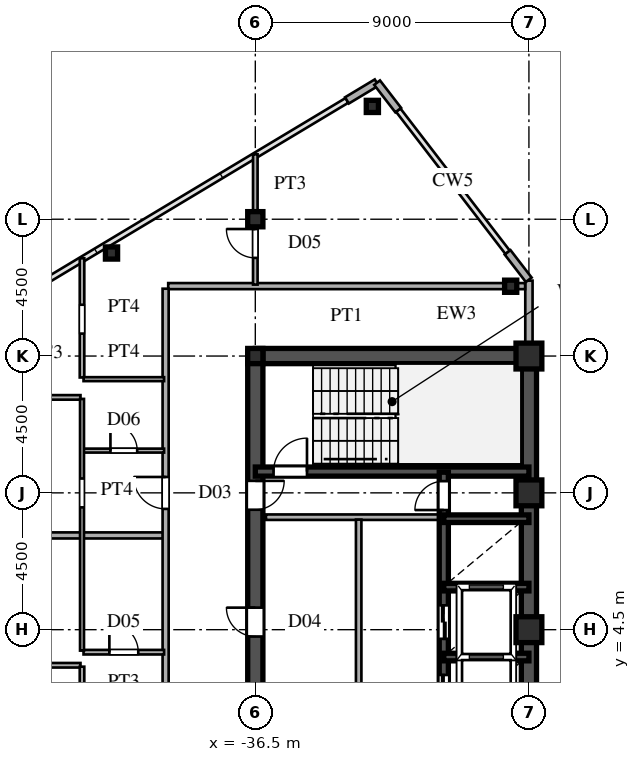
"""IFC4 building model, lengths in metres.
Left out: names, types, materials, properties, quantities, classifications, styles, units other than length and angle.
Written with IfcOpenShell. Run it as: python <this file> out.ifc"""

import sys

from ifc_helpers import new_model, si_unit, direction, frame, frame_2d, origin, origin_2d, place, context, subcontext, project, spatial, rectangle, hollow_rectangle, i_section, extrude, source, transform, mapped, element, fill, save


model = new_model("IFC4")
c1 = context("Model", 3, precision=1e-05, world=origin(), true_north=direction((0.0, 1.0)))
c2 = subcontext(c1, "Body", "Model", "MODEL_VIEW")
j1 = project(units=[si_unit("LENGTHUNIT", "METRE"), si_unit("PLANEANGLEUNIT", "RADIAN")], contexts=[c1])
p1 = place(None, origin())
s1 = spatial("IfcSite", under=j1, at=p1, CompositionType="ELEMENT")
p2 = place(p1, origin())
s2 = spatial("IfcBuilding", under=s1, at=p2, CompositionType="ELEMENT")
p3 = place(p2, frame((0.0, 0.0, 217.5)))
s3 = spatial("IfcBuildingStorey", under=s2, at=p3, CompositionType="ELEMENT", Elevation=217.5)
m1 = source(origin(), c2, "Body", "SweptSolid", [
    extrude(hollow_rectangle(XDim=0.85, YDim=0.85, WallThickness=0.036, at=origin_2d()), origin(), (0.0, 0.0, 1.0), 3.6),
])
for number, where, z_axis, x_axis in (
    (1, (-27.5, 4.5, 0.0), (0.0, 0.0, 1.0), (1.0, 0.0, 0.0)),
    (2, (-27.5, 9.0, 0.0), (0.0, 0.0, 1.0), (1.0, 0.0, 0.0)),
    (3, (-27.5, 13.5, 0.0), (0.0, 0.0, 1.0), (1.0, 0.0, 0.0)),
):
    element("IfcColumn", number, at=place(p3, frame(where, z_axis=z_axis, x_axis=x_axis)), inside=s3, PredefinedType="COLUMN", context=c2, shape_type="MappedRepresentation", body=[
        mapped(m1, transform((0.0, 0.0, 0.0), scale=1.0)),
    ])
m2 = source(origin(), c2, "Body", "SweptSolid", [
    extrude(i_section(OverallWidth=0.5, OverallDepth=0.5, WebThickness=0.02, FlangeThickness=0.032, at=origin_2d()), origin(), (0.0, 0.0, 1.0), 3.6),
])
for number, where, z_axis, x_axis in (
    (4, (-36.5, 13.5, 0.0), (0.0, 0.0, 1.0), (1.0, 0.0, 0.0)),
    (5, (-36.5, 18.0, 0.0), (0.0, 0.0, 1.0), (1.0, 0.0, 0.0)),
):
    element("IfcColumn", number, at=place(p3, frame(where, z_axis=z_axis, x_axis=x_axis)), inside=s3, PredefinedType="COLUMN", context=c2, shape_type="MappedRepresentation", body=[
        mapped(m2, transform((0.0, 0.0, 0.0), scale=1.0)),
    ])
m3 = source(origin(), c2, "Body", "SweptSolid", [
    extrude(hollow_rectangle(XDim=0.4, YDim=0.4, WallThickness=0.016, at=origin_2d()), origin(), (0.0, 0.0, 1.0), 3.6),
])
for number, where, z_axis, x_axis in (
    (6, (-28.1, 15.796, 0.0), (0.0, 0.0, 1.0), (1.0, 0.0, 0.0)),
    (7, (-32.65, 21.71, 0.0), (0.0, 0.0, 1.0), (1.0, 0.0, 0.0)),
    (8, (-41.23, 16.889, 0.0), (0.0, 0.0, 1.0), (1.0, 0.0, 0.0)),
):
    element("IfcColumn", number, at=place(p3, frame(where, z_axis=z_axis, x_axis=x_axis)), inside=s3, PredefinedType="COLUMN", context=c2, shape_type="MappedRepresentation", body=[
        mapped(m3, transform((0.0, 0.0, 0.0), scale=1.0)),
    ])
p4 = place(p3, frame((-27.5, 13.755, 0.0), z_axis=(0.0, 0.0, 1.0), x_axis=(0.0, 1.0, 0.0)))
e9 = element("IfcWall", 9, at=p4, inside=s3, PredefinedType="SOLIDWALL", context=c2, shape_type="SweptSolid", body=[
    extrude(rectangle(XDim=0.62, YDim=0.24, at=frame_2d((0.31, 0.0))), origin(), (0.0, 0.0, 1.0), 2.88),
])
p5 = place(p3, frame((-27.5, 14.375, 0.0), z_axis=(0.0, 0.0, 1.0), x_axis=(0.0, 1.0, 0.0)))
e10 = element("IfcWall", 10, at=p5, inside=s3, PredefinedType="SOLIDWALL", context=c2, shape_type="SweptSolid", body=[
    extrude(rectangle(XDim=1.605, YDim=0.24, at=frame_2d((0.803, 0.0))), origin(), (0.0, 0.0, 1.0), 3.38),
])
for number, where, z_axis, x_axis in (
    (11, (-27.506, 16.008, 0.0), (0.0, 0.0, 1.0), (-0.61, 0.793, 0.0)),
    (12, (-31.799, 21.588, 0.0), (0.0, 0.0, 1.0), (-0.61, 0.793, 0.0)),
    (13, (-32.509, 22.495, 0.0), (0.0, 0.0, 1.0), (-0.857, -0.515, 0.0)),
):
    element("IfcWall", number, at=place(p3, frame(where, z_axis=z_axis, x_axis=x_axis)), inside=s3, PredefinedType="SOLIDWALL", context=c2, shape_type="SweptSolid", body=[
        extrude(rectangle(XDim=1.14, YDim=0.24, at=frame_2d((0.57, 0.0))), origin(), (0.0, 0.0, 1.0), 3.38),
    ])
p6 = place(p3, frame((-27.5, 1.3, 0.0), z_axis=(0.0, 0.0, 1.0), x_axis=(0.0, 1.0, 0.0)))
e14 = element("IfcWall", 14, at=p6, inside=s3, PredefinedType="SHEAR", context=c2, shape_type="SweptSolid", body=[
    extrude(rectangle(XDim=12.2, YDim=0.5, at=frame_2d((6.1, 0.0))), origin(), (0.0, 0.0, 1.0), 3.38),
])
p7 = place(p3, frame((-36.5, 13.5, 0.0), z_axis=(0.0, 0.0, 1.0), x_axis=(1.0, 0.0, 0.0)))
e15 = element("IfcWall", 15, at=p7, inside=s3, PredefinedType="SHEAR", context=c2, shape_type="SweptSolid", body=[
    extrude(rectangle(XDim=9.0, YDim=0.5, at=frame_2d((4.5, 0.0))), origin(), (0.0, 0.0, 1.0), 3.38),
])
p8 = place(p3, frame((-36.5, 8.2, 0.0), z_axis=(0.0, 0.0, 1.0), x_axis=(0.0, 1.0, 0.0)))
e16 = element("IfcWall", 16, at=p8, inside=s3, PredefinedType="SHEAR", context=c2, shape_type="SweptSolid", body=[
    extrude(rectangle(XDim=5.45, YDim=0.5, at=frame_2d((2.725, 0.0))), origin(), (0.0, 0.0, 1.0), 3.38),
])
p9 = place(p8, frame((0.245, 0.0, 0.0)))
e17 = element("IfcOpeningElement", 17, at=p9, cuts=e16, PredefinedType="OPENING", context=c2, shape_type="SweptSolid", body=[
    extrude(rectangle(XDim=0.95, YDim=2.15, at=frame_2d((0.475, 1.075))), frame((0.0, 0.26, 0.0), z_axis=(0.0, -1.0, 0.0), x_axis=(1.0, 0.0, 0.0)), (0.0, 0.0, 1.0), 0.52),
])
p10 = place(p3, frame((-36.5, 1.3, 0.0), z_axis=(0.0, 0.0, 1.0), x_axis=(0.0, 1.0, 0.0)))
e18 = element("IfcWall", 18, at=p10, inside=s3, PredefinedType="SHEAR", context=c2, shape_type="SweptSolid", body=[
    extrude(rectangle(XDim=6.9, YDim=0.5, at=frame_2d((3.45, 0.0))), origin(), (0.0, 0.0, 1.0), 3.38),
])
p11 = place(p10, frame((2.975, 0.0, 0.0)))
e19 = element("IfcOpeningElement", 19, at=p11, cuts=e18, PredefinedType="OPENING", context=c2, shape_type="SweptSolid", body=[
    extrude(rectangle(XDim=0.95, YDim=2.15, at=frame_2d((0.475, 1.075))), frame((0.0, 0.26, 0.0), z_axis=(0.0, -1.0, 0.0), x_axis=(1.0, 0.0, 0.0)), (0.0, 0.0, 1.0), 0.52),
])
p12 = place(p3, frame((-36.5, 9.7, 0.0), z_axis=(0.0, 0.0, 1.0), x_axis=(1.0, 0.0, 0.0)))
e20 = element("IfcWall", 20, at=p12, inside=s3, PredefinedType="SHEAR", context=c2, shape_type="SweptSolid", body=[
    extrude(rectangle(XDim=9.0, YDim=0.3, at=frame_2d((4.5, 0.0))), origin(), (0.0, 0.0, 1.0), 3.38),
])
p13 = place(p12, frame((0.6, 0.0, 0.0)))
e21 = element("IfcOpeningElement", 21, at=p13, cuts=e20, PredefinedType="OPENING", context=c2, shape_type="SweptSolid", body=[
    extrude(rectangle(XDim=1.1, YDim=2.2, at=frame_2d((0.55, 1.1))), frame((0.0, 0.16, 0.0), z_axis=(0.0, -1.0, 0.0), x_axis=(1.0, 0.0, 0.0)), (0.0, 0.0, 1.0), 0.32),
])
for number, where, z_axis, x_axis in (
    (22, (-30.3, 3.6, 0.0), (0.0, 0.0, 1.0), (1.0, 0.0, 0.0)),
    (23, (-30.3, 5.9, 0.0), (0.0, 0.0, 1.0), (1.0, 0.0, 0.0)),
    (24, (-30.3, 8.15, 0.0), (0.0, 0.0, 1.0), (1.0, 0.0, 0.0)),
):
    element("IfcWall", number, at=place(p3, frame(where, z_axis=z_axis, x_axis=x_axis)), inside=s3, PredefinedType="SHEAR", context=c2, shape_type="SweptSolid", body=[
        extrude(rectangle(XDim=2.8, YDim=0.25, at=frame_2d((1.4, 0.0))), origin(), (0.0, 0.0, 1.0), 3.38),
    ])
p14 = place(p3, frame((-30.3, 1.32, 0.0), z_axis=(0.0, 0.0, 1.0), x_axis=(0.0, 1.0, 0.0)))
e25 = element("IfcWall", 25, at=p14, inside=s3, PredefinedType="SHEAR", context=c2, shape_type="SweptSolid", body=[
    extrude(rectangle(XDim=2.28, YDim=0.3, at=frame_2d((1.14, 0.0))), origin(), (0.0, 0.0, 1.0), 3.38),
])
p15 = place(p14, frame((0.59, 0.0, 0.0)))
e26 = element("IfcOpeningElement", 26, at=p15, cuts=e25, PredefinedType="OPENING", context=c2, shape_type="SweptSolid", body=[
    extrude(rectangle(XDim=1.1, YDim=2.2, at=frame_2d((0.55, 1.1))), frame((0.0, 0.16, 0.0), z_axis=(0.0, -1.0, 0.0), x_axis=(1.0, 0.0, 0.0)), (0.0, 0.0, 1.0), 0.32),
])
p16 = place(p3, frame((-30.3, 3.6, 0.0), z_axis=(0.0, 0.0, 1.0), x_axis=(0.0, 1.0, 0.0)))
e27 = element("IfcWall", 27, at=p16, inside=s3, PredefinedType="SHEAR", context=c2, shape_type="SweptSolid", body=[
    extrude(rectangle(XDim=2.3, YDim=0.3, at=frame_2d((1.15, 0.0))), origin(), (0.0, 0.0, 1.0), 3.38),
])
p17 = place(p16, frame((0.6, 0.0, 0.0)))
e28 = element("IfcOpeningElement", 28, at=p17, cuts=e27, PredefinedType="OPENING", context=c2, shape_type="SweptSolid", body=[
    extrude(rectangle(XDim=1.1, YDim=2.2, at=frame_2d((0.55, 1.1))), frame((0.0, 0.16, 0.0), z_axis=(0.0, -1.0, 0.0), x_axis=(1.0, 0.0, 0.0)), (0.0, 0.0, 1.0), 0.32),
])
p18 = place(p3, frame((-30.3, 5.9, 0.0), z_axis=(0.0, 0.0, 1.0), x_axis=(0.0, 1.0, 0.0)))
e29 = element("IfcWall", 29, at=p18, inside=s3, PredefinedType="SHEAR", context=c2, shape_type="SweptSolid", body=[
    extrude(rectangle(XDim=2.25, YDim=0.3, at=frame_2d((1.125, 0.0))), origin(), (0.0, 0.0, 1.0), 3.38),
])
p19 = place(p3, frame((-30.3, 8.15, 0.0), z_axis=(0.0, 0.0, 1.0), x_axis=(0.0, 1.0, 0.0)))
e30 = element("IfcWall", 30, at=p19, inside=s3, PredefinedType="SHEAR", context=c2, shape_type="SweptSolid", body=[
    extrude(rectangle(XDim=1.53, YDim=0.3, at=frame_2d((0.765, 0.0))), origin(), (0.0, 0.0, 1.0), 3.38),
])
p20 = place(p19, frame((0.285, 0.0, 0.0)))
e31 = element("IfcOpeningElement", 31, at=p20, cuts=e30, PredefinedType="OPENING", context=c2, shape_type="SweptSolid", body=[
    extrude(rectangle(XDim=0.95, YDim=2.15, at=frame_2d((0.475, 1.075))), frame((0.0, 0.16, 0.0), z_axis=(0.0, -1.0, 0.0), x_axis=(1.0, 0.0, 0.0)), (0.0, 0.0, 1.0), 0.32),
])
p21 = place(p3, frame((-36.15, 8.2, 0.0), z_axis=(0.0, 0.0, 1.0), x_axis=(1.0, 0.0, 0.0)))
e32 = element("IfcWall", 32, at=p21, inside=s3, PredefinedType="PARTITIONING", context=c2, shape_type="SweptSolid", body=[
    extrude(rectangle(XDim=5.7, YDim=0.18, at=frame_2d((2.85, 0.0))), origin(), (0.0, 0.0, 1.0), 3.38),
])
p22 = place(p3, frame((-33.1, 1.38, 0.0), z_axis=(0.0, 0.0, 1.0), x_axis=(0.0, 1.0, 0.0)))
e33 = element("IfcWall", 33, at=p22, inside=s3, PredefinedType="PARTITIONING", context=c2, shape_type="SweptSolid", body=[
    extrude(rectangle(XDim=6.74, YDim=0.18, at=frame_2d((3.37, 0.0))), origin(), (0.0, 0.0, 1.0), 3.38),
])
p23 = place(p3, frame((-64.48, 3.33, 0.0), z_axis=(0.0, 0.0, 1.0), x_axis=(1.0, 0.0, 0.0)))
e34 = element("IfcWall", 34, at=p23, inside=s3, PredefinedType="PARTITIONING", context=c2, shape_type="SweptSolid", body=[
    extrude(rectangle(XDim=22.23, YDim=0.15, at=frame_2d((11.115, 0.0))), origin(), (0.0, 0.0, 1.0), 3.38),
])
p24 = place(p23, frame((15.655, 0.0, 0.0)))
e35 = element("IfcOpeningElement", 35, at=p24, cuts=e34, PredefinedType="OPENING", context=c2, shape_type="SweptSolid", body=[
    extrude(rectangle(XDim=0.95, YDim=2.15, at=frame_2d((0.475, 1.075))), frame((0.0, 0.085, 0.0), z_axis=(0.0, -1.0, 0.0), x_axis=(1.0, 0.0, 0.0)), (0.0, 0.0, 1.0), 0.17),
])
p25 = place(p23, frame((4.533, 0.0, 0.0)))
e36 = element("IfcOpeningElement", 36, at=p25, cuts=e34, PredefinedType="OPENING", context=c2, shape_type="SweptSolid", body=[
    extrude(rectangle(XDim=0.95, YDim=2.15, at=frame_2d((0.475, 1.075))), frame((0.0, 0.085, 0.0), z_axis=(0.0, -1.0, 0.0), x_axis=(1.0, 0.0, 0.0)), (0.0, 0.0, 1.0), 0.17),
])
p26 = place(p3, frame((-42.15, 3.76, 0.0), z_axis=(0.0, 0.0, 1.0), x_axis=(1.0, 0.0, 0.0)))
e37 = element("IfcWall", 37, at=p26, inside=s3, PredefinedType="PARTITIONING", context=c2, shape_type="SweptSolid", body=[
    extrude(rectangle(XDim=2.65, YDim=0.15, at=frame_2d((1.325, 0.0))), origin(), (0.0, 0.0, 1.0), 3.38),
])
p27 = place(p26, frame((0.85, 0.0, 0.0)))
e38 = element("IfcOpeningElement", 38, at=p27, cuts=e37, PredefinedType="OPENING", context=c2, shape_type="SweptSolid", body=[
    extrude(rectangle(XDim=0.95, YDim=2.15, at=frame_2d((0.475, 1.075))), frame((0.0, 0.085, 0.0), z_axis=(0.0, -1.0, 0.0), x_axis=(1.0, 0.0, 0.0)), (0.0, 0.0, 1.0), 0.17),
])
p28 = place(p3, frame((-57.343, 7.6, 0.0), z_axis=(0.0, 0.0, 1.0), x_axis=(1.0, 0.0, 0.0)))
e39 = element("IfcWall", 39, at=p28, inside=s3, PredefinedType="PARTITIONING", context=c2, shape_type="SweptSolid", body=[
    extrude(rectangle(XDim=17.813, YDim=0.2, at=frame_2d((8.906, 0.0))), origin(), (0.0, 0.0, 1.0), 3.38),
])
p29 = place(p3, frame((-42.15, 10.39, 0.0), z_axis=(0.0, 0.0, 1.0), x_axis=(1.0, 0.0, 0.0)))
e40 = element("IfcWall", 40, at=p29, inside=s3, PredefinedType="PARTITIONING", context=c2, shape_type="SweptSolid", body=[
    extrude(rectangle(XDim=2.65, YDim=0.13, at=frame_2d((1.325, 0.0))), origin(), (0.0, 0.0, 1.0), 3.38),
])
p30 = place(p29, frame((0.885, 0.0, 0.0)))
e41 = element("IfcOpeningElement", 41, at=p30, cuts=e40, PredefinedType="OPENING", context=c2, shape_type="SweptSolid", body=[
    extrude(rectangle(XDim=0.88, YDim=2.1, at=frame_2d((0.44, 1.05))), frame((0.0, 0.075, 0.0), z_axis=(0.0, -1.0, 0.0), x_axis=(1.0, 0.0, 0.0)), (0.0, 0.0, 1.0), 0.15),
])
p31 = place(p3, frame((-49.802, 12.14, 0.0), z_axis=(0.0, 0.0, 1.0), x_axis=(1.0, 0.0, 0.0)))
e42 = element("IfcWall", 42, at=p31, inside=s3, PredefinedType="PARTITIONING", context=c2, shape_type="SweptSolid", body=[
    extrude(rectangle(XDim=7.552, YDim=0.15, at=frame_2d((3.776, 0.0))), origin(), (0.0, 0.0, 1.0), 3.38),
])
p32 = place(p31, frame((3.002, 0.0, 0.0)))
e43 = element("IfcOpeningElement", 43, at=p32, cuts=e42, PredefinedType="OPENING", context=c2, shape_type="SweptSolid", body=[
    extrude(rectangle(XDim=0.95, YDim=2.15, at=frame_2d((0.475, 1.075))), frame((0.0, 0.085, 0.0), z_axis=(0.0, -1.0, 0.0), x_axis=(1.0, 0.0, 0.0)), (0.0, 0.0, 1.0), 0.17),
])
p33 = place(p3, frame((-42.15, 12.74, 0.0), z_axis=(0.0, 0.0, 1.0), x_axis=(1.0, 0.0, 0.0)))
e44 = element("IfcWall", 44, at=p33, inside=s3, PredefinedType="PARTITIONING", context=c2, shape_type="SweptSolid", body=[
    extrude(rectangle(XDim=2.65, YDim=0.13, at=frame_2d((1.325, 0.0))), origin(), (0.0, 0.0, 1.0), 3.38),
])
p34 = place(p3, frame((-39.365, 15.8, 0.0), z_axis=(0.0, 0.0, 1.0), x_axis=(1.0, 0.0, 0.0)))
e45 = element("IfcWall", 45, at=p34, inside=s3, PredefinedType="PARTITIONING", context=c2, shape_type="SweptSolid", body=[
    extrude(rectangle(XDim=11.74, YDim=0.2, at=frame_2d((5.87, 0.0))), origin(), (0.0, 0.0, 1.0), 3.38),
])
p35 = place(p3, frame((-42.2, -0.883, 0.0), z_axis=(0.0, 0.0, 1.0), x_axis=(0.0, 1.0, 0.0)))
e46 = element("IfcWall", 46, at=p35, inside=s3, PredefinedType="PARTITIONING", context=c2, shape_type="SweptSolid", body=[
    extrude(rectangle(XDim=4.166, YDim=0.15, at=frame_2d((2.083, 0.0))), origin(), (0.0, 0.0, 1.0), 3.38),
])
p36 = place(p35, frame((1.608, 0.0, 0.0)))
e47 = element("IfcOpeningElement", 47, at=p36, cuts=e46, PredefinedType="OPENING", context=c2, shape_type="SweptSolid", body=[
    extrude(rectangle(XDim=0.95, YDim=2.15, at=frame_2d((0.475, 1.075))), frame((0.0, 0.085, 0.0), z_axis=(0.0, -1.0, 0.0), x_axis=(1.0, 0.0, 0.0)), (0.0, 0.0, 1.0), 0.17),
])
p37 = place(p3, frame((-42.2, 3.812, 0.0), z_axis=(0.0, 0.0, 1.0), x_axis=(0.0, 1.0, 0.0)))
e48 = element("IfcWall", 48, at=p37, inside=s3, PredefinedType="PARTITIONING", context=c2, shape_type="SweptSolid", body=[
    extrude(rectangle(XDim=8.278, YDim=0.13, at=frame_2d((4.139, 0.0))), origin(), (0.0, 0.0, 1.0), 3.38),
])
p38 = place(p37, frame((4.71, 0.0, 0.0)))
e49 = element("IfcOpeningElement", 49, at=p38, cuts=e48, PredefinedType="OPENING", context=c2, shape_type="SweptSolid", body=[
    extrude(rectangle(XDim=0.95, YDim=2.15, at=frame_2d((0.475, 1.075))), frame((0.0, 0.075, 0.0), z_axis=(0.0, -1.0, 0.0), x_axis=(1.0, 0.0, 0.0)), (0.0, 0.0, 1.0), 0.15),
])
p39 = place(p3, frame((-42.2, 12.795, 0.0), z_axis=(0.0, 0.0, 1.0), x_axis=(0.0, 1.0, 0.0)))
e50 = element("IfcWall", 50, at=p39, inside=s3, PredefinedType="PARTITIONING", context=c2, shape_type="SweptSolid", body=[
    extrude(rectangle(XDim=3.92, YDim=0.15, at=frame_2d((1.96, 0.0))), origin(), (0.0, 0.0, 1.0), 3.38),
])
p40 = place(p39, frame((1.442, 0.0, 0.0)))
e51 = element("IfcOpeningElement", 51, at=p40, cuts=e50, PredefinedType="OPENING", context=c2, shape_type="SweptSolid", body=[
    extrude(rectangle(XDim=0.95, YDim=2.15, at=frame_2d((0.475, 1.075))), frame((0.0, 0.085, 0.0), z_axis=(0.0, -1.0, 0.0), x_axis=(1.0, 0.0, 0.0)), (0.0, 0.0, 1.0), 0.17),
])
p41 = place(p3, frame((-39.45, -15.715, 0.0), z_axis=(0.0, 0.0, 1.0), x_axis=(0.0, 1.0, 0.0)))
e52 = element("IfcWall", 52, at=p41, inside=s3, PredefinedType="PARTITIONING", context=c2, shape_type="SweptSolid", body=[
    extrude(rectangle(XDim=31.43, YDim=0.2, at=frame_2d((15.715, 0.0))), origin(), (0.0, 0.0, 1.0), 3.38),
])
p42 = place(p41, frame((4.69, 0.0, 0.0)))
e53 = element("IfcOpeningElement", 53, at=p42, cuts=e52, PredefinedType="OPENING", context=c2, shape_type="SweptSolid", body=[
    extrude(rectangle(XDim=1.05, YDim=2.25, at=frame_2d((0.525, 1.125))), frame((0.0, 0.11, 0.0), z_axis=(0.0, -1.0, 0.0), x_axis=(1.0, 0.0, 0.0)), (0.0, 0.0, 1.0), 0.22),
])
p43 = place(p41, frame((16.198, 0.0, 0.0)))
e54 = element("IfcOpeningElement", 54, at=p43, cuts=e52, PredefinedType="OPENING", context=c2, shape_type="SweptSolid", body=[
    extrude(rectangle(XDim=1.05, YDim=2.25, at=frame_2d((0.525, 1.125))), frame((0.0, 0.11, 0.0), z_axis=(0.0, -1.0, 0.0), x_axis=(1.0, 0.0, 0.0)), (0.0, 0.0, 1.0), 0.22),
])
p44 = place(p41, frame((24.188, 0.0, 0.0)))
e55 = element("IfcOpeningElement", 55, at=p44, cuts=e52, PredefinedType="OPENING", context=c2, shape_type="SweptSolid", body=[
    extrude(rectangle(XDim=1.05, YDim=2.25, at=frame_2d((0.525, 1.125))), frame((0.0, 0.11, 0.0), z_axis=(0.0, -1.0, 0.0), x_axis=(1.0, 0.0, 0.0)), (0.0, 0.0, 1.0), 0.22),
])
p45 = place(p3, frame((-36.5, 15.85, 0.0), z_axis=(0.0, 0.0, 1.0), x_axis=(0.0, 1.0, 0.0)))
e56 = element("IfcWall", 56, at=p45, inside=s3, PredefinedType="PARTITIONING", context=c2, shape_type="SweptSolid", body=[
    extrude(rectangle(XDim=4.285, YDim=0.15, at=frame_2d((2.143, 0.0))), origin(), (0.0, 0.0, 1.0), 2.78),
])
p46 = place(p45, frame((0.878, 0.0, 0.0)))
e57 = element("IfcOpeningElement", 57, at=p46, cuts=e56, PredefinedType="OPENING", context=c2, shape_type="SweptSolid", body=[
    extrude(rectangle(XDim=0.95, YDim=2.15, at=frame_2d((0.475, 1.075))), frame((0.0, 0.085, 0.0), z_axis=(0.0, -1.0, 0.0), x_axis=(1.0, 0.0, 0.0)), (0.0, 0.0, 1.0), 0.17),
])
m4 = source(origin(), c2, "Body", "SweptSolid", [
    extrude(rectangle(XDim=0.95, YDim=2.15, at=frame_2d((0.475, 1.075))), frame((0.0, 0.025, 0.0), z_axis=(0.0, -1.0, 0.0), x_axis=(1.0, 0.0, 0.0)), (0.0, 0.0, 1.0), 0.05),
])
p47 = place(p9, frame((0.95, 0.0, 0.0), z_axis=(0.0, 0.0, 1.0), x_axis=(-1.0, 0.0, 0.0)))
e58 = element("IfcDoor", 58, at=p47, inside=s3, OperationType="SINGLE_SWING_RIGHT", PredefinedType="DOOR", context=c2, shape_type="MappedRepresentation", body=[
    mapped(m4, transform((0.0, 0.0, 0.0), scale=1.0)),
])
fill(e17, e58)
p48 = place(p11, origin())
e59 = element("IfcDoor", 59, at=p48, inside=s3, OperationType="SINGLE_SWING_RIGHT", PredefinedType="DOOR", context=c2, shape_type="MappedRepresentation", body=[
    mapped(m4, transform((0.0, 0.0, 0.0), scale=1.0)),
])
fill(e19, e59)
m5 = source(origin(), c2, "Body", "SweptSolid", [
    extrude(rectangle(XDim=1.1, YDim=2.2, at=frame_2d((0.55, 1.1))), frame((0.0, 0.025, 0.0), z_axis=(0.0, -1.0, 0.0), x_axis=(1.0, 0.0, 0.0)), (0.0, 0.0, 1.0), 0.05),
])
p49 = place(p13, origin())
e60 = element("IfcDoor", 60, at=p49, inside=s3, OperationType="SINGLE_SWING_RIGHT", PredefinedType="DOOR", context=c2, shape_type="MappedRepresentation", body=[
    mapped(m5, transform((0.0, 0.0, 0.0), scale=1.0)),
])
fill(e21, e60)
m6 = source(origin(), c2, "Body", "SweptSolid", [
    extrude(rectangle(XDim=1.1, YDim=2.2, at=frame_2d((0.55, 1.1))), frame((0.0, 0.025, 0.0), z_axis=(0.0, -1.0, 0.0), x_axis=(1.0, 0.0, 0.0)), (0.0, 0.0, 1.0), 0.05),
])
p50 = place(p15, origin())
e61 = element("IfcDoor", 61, at=p50, inside=s3, OperationType="DOUBLE_DOOR_SLIDING", PredefinedType="DOOR", context=c2, shape_type="MappedRepresentation", body=[
    mapped(m6, transform((0.0, 0.0, 0.0), scale=1.0)),
])
fill(e26, e61)
p51 = place(p17, origin())
e62 = element("IfcDoor", 62, at=p51, inside=s3, OperationType="DOUBLE_DOOR_SLIDING", PredefinedType="DOOR", context=c2, shape_type="MappedRepresentation", body=[
    mapped(m6, transform((0.0, 0.0, 0.0), scale=1.0)),
])
fill(e28, e62)
p52 = place(p20, origin())
e63 = element("IfcDoor", 63, at=p52, inside=s3, OperationType="SINGLE_SWING_LEFT", PredefinedType="DOOR", context=c2, shape_type="MappedRepresentation", body=[
    mapped(m4, transform((0.0, 0.0, 0.0), scale=1.0)),
])
fill(e31, e63)
m7 = source(origin(), c2, "Body", "SweptSolid", [
    extrude(rectangle(XDim=0.95, YDim=2.15, at=frame_2d((0.475, 1.075))), frame((0.0, 0.025, 0.0), z_axis=(0.0, -1.0, 0.0), x_axis=(1.0, 0.0, 0.0)), (0.0, 0.0, 1.0), 0.05),
])
p53 = place(p27, origin())
e64 = element("IfcDoor", 64, at=p53, inside=s3, OperationType="SINGLE_SWING_LEFT", PredefinedType="DOOR", context=c2, shape_type="MappedRepresentation", body=[
    mapped(m7, transform((0.0, 0.0, 0.0), scale=1.0)),
])
fill(e38, e64)
m8 = source(origin(), c2, "Body", "SweptSolid", [
    extrude(rectangle(XDim=0.88, YDim=2.1, at=frame_2d((0.44, 1.05))), frame((0.0, 0.025, 0.0), z_axis=(0.0, -1.0, 0.0), x_axis=(1.0, 0.0, 0.0)), (0.0, 0.0, 1.0), 0.05),
])
p54 = place(p30, origin())
e65 = element("IfcDoor", 65, at=p54, inside=s3, OperationType="SINGLE_SWING_LEFT", PredefinedType="DOOR", context=c2, shape_type="MappedRepresentation", body=[
    mapped(m8, transform((0.0, 0.0, 0.0), scale=1.0)),
])
fill(e41, e65)
m9 = source(origin(), c2, "Body", "SweptSolid", [
    extrude(rectangle(XDim=1.05, YDim=2.25, at=frame_2d((0.525, 1.125))), frame((0.0, 0.025, 0.0), z_axis=(0.0, -1.0, 0.0), x_axis=(1.0, 0.0, 0.0)), (0.0, 0.0, 1.0), 0.05),
])
p55 = place(p44, origin())
e66 = element("IfcDoor", 66, at=p55, inside=s3, OperationType="SINGLE_SWING_RIGHT", PredefinedType="DOOR", context=c2, shape_type="MappedRepresentation", body=[
    mapped(m9, transform((0.0, 0.0, 0.0), scale=1.0)),
])
fill(e55, e66)
p56 = place(p46, origin())
e67 = element("IfcDoor", 67, at=p56, inside=s3, OperationType="SINGLE_SWING_RIGHT", PredefinedType="DOOR", context=c2, shape_type="MappedRepresentation", body=[
    mapped(m7, transform((0.0, 0.0, 0.0), scale=1.0)),
])
fill(e57, e67)
save(model, sys.argv[1])
